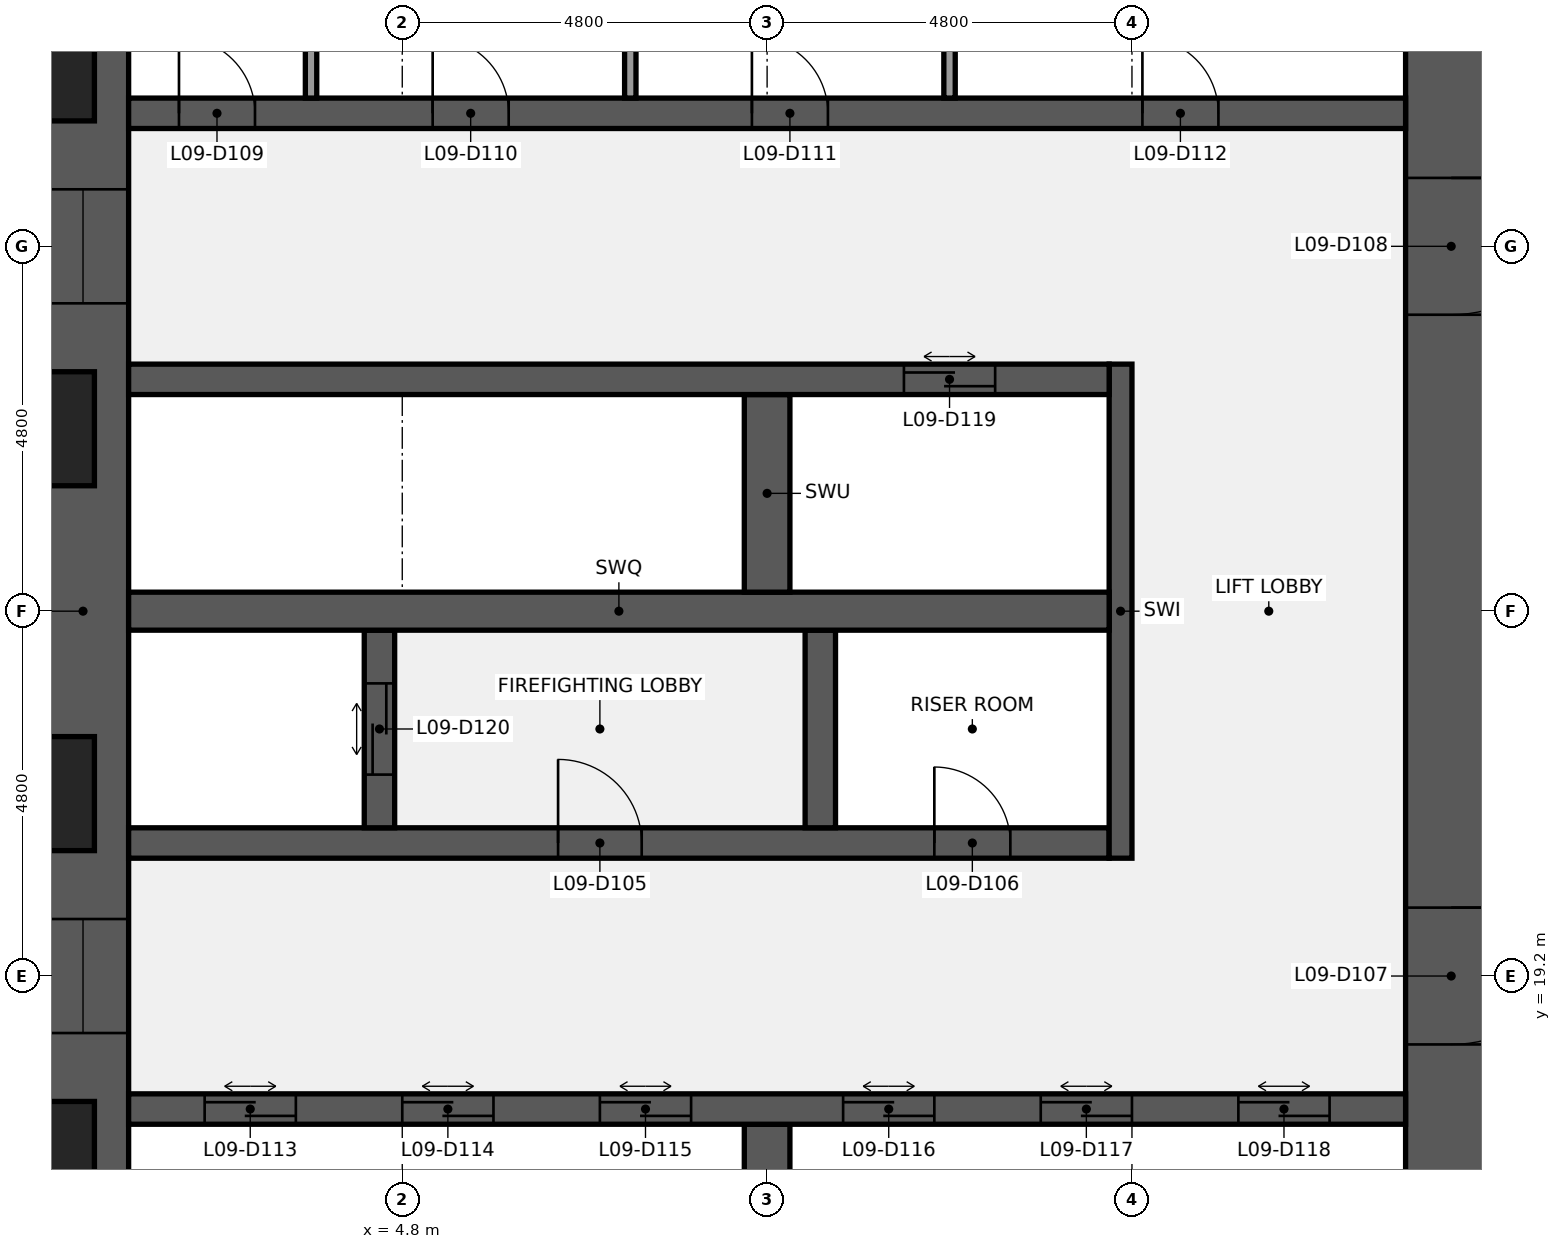
"""IFC4 building model, lengths in metres.
Left out: names, types, materials, properties, quantities, classifications, styles, units other than length and angle.
Written with IfcOpenShell. Run it as: python <this file> out.ifc"""

import sys

from ifc_helpers import new_model, si_unit, direction, frame, frame_2d, origin, place, context, subcontext, project, spatial, rectangle, extrude, element, fill, save


model = new_model("IFC4")
c1 = context("Model", 3, precision=1e-05, world=origin(), true_north=direction((0.0, 1.0)))
c2 = subcontext(c1, "Body", "Model", "MODEL_VIEW")
j1 = project(units=[si_unit("LENGTHUNIT", "METRE"), si_unit("PLANEANGLEUNIT", "RADIAN")], contexts=[c1])
p1 = place(None, origin())
s1 = spatial("IfcSite", under=j1, at=p1, CompositionType="ELEMENT")
p2 = place(p1, origin())
s2 = spatial("IfcBuilding", under=s1, at=p2, CompositionType="ELEMENT")
p3 = place(p2, frame((0.0, 0.0, 47.0)))
s3 = spatial("IfcBuildingStorey", under=s2, at=p3, CompositionType="ELEMENT", Elevation=47.0)
p4 = place(p3, frame((0.6, 9.6, 0.0), z_axis=(0.0, 0.0, 1.0), x_axis=(0.0, 1.0, 0.0)))
e1 = element("IfcWall", 1, at=p4, inside=s3, PredefinedType="SHEAR", context=c2, shape_type="SweptSolid", body=[
    extrude(rectangle(XDim=28.8, YDim=1.2, at=frame_2d((14.4, 0.0))), origin(), (0.0, 0.0, 1.0), 3.84),
])
p5 = place(p4, frame((8.85, 0.0, 0.9)))
e2 = element("IfcOpeningElement", 2, at=p5, cuts=e1, PredefinedType="OPENING", context=c2, shape_type="SweptSolid", body=[
    extrude(rectangle(XDim=1.5, YDim=1.5, at=frame_2d((0.75, 0.75))), frame((0.0, 0.61, 0.0), z_axis=(0.0, -1.0, 0.0), x_axis=(1.0, 0.0, 0.0)), (0.0, 0.0, 1.0), 1.22),
])
p6 = place(p4, frame((18.45, 0.0, 0.9)))
e3 = element("IfcOpeningElement", 3, at=p6, cuts=e1, PredefinedType="OPENING", context=c2, shape_type="SweptSolid", body=[
    extrude(rectangle(XDim=1.5, YDim=1.5, at=frame_2d((0.75, 0.75))), frame((0.0, 0.61, 0.0), z_axis=(0.0, -1.0, 0.0), x_axis=(1.0, 0.0, 0.0)), (0.0, 0.0, 1.0), 1.22),
])
p7 = place(p3, frame((18.6, 38.4, 0.0), z_axis=(0.0, 0.0, 1.0), x_axis=(0.0, -1.0, 0.0)))
e4 = element("IfcWall", 4, at=p7, inside=s3, PredefinedType="SHEAR", context=c2, shape_type="SweptSolid", body=[
    extrude(rectangle(XDim=28.8, YDim=1.2, at=frame_2d((14.4, 0.0))), origin(), (0.0, 0.0, 1.0), 3.84),
])
p8 = place(p7, frame((18.3, 0.0, 0.0)))
e5 = element("IfcOpeningElement", 5, at=p8, cuts=e4, PredefinedType="OPENING", context=c2, shape_type="SweptSolid", body=[
    extrude(rectangle(XDim=1.8, YDim=2.1, at=frame_2d((0.9, 1.05))), frame((0.0, 0.61, 0.0), z_axis=(0.0, -1.0, 0.0), x_axis=(1.0, 0.0, 0.0)), (0.0, 0.0, 1.0), 1.22),
])
p9 = place(p7, frame((8.7, 0.0, 0.0)))
e6 = element("IfcOpeningElement", 6, at=p9, cuts=e4, PredefinedType="OPENING", context=c2, shape_type="SweptSolid", body=[
    extrude(rectangle(XDim=1.8, YDim=2.1, at=frame_2d((0.9, 1.05))), frame((0.0, 0.61, 0.0), z_axis=(0.0, -1.0, 0.0), x_axis=(1.0, 0.0, 0.0)), (0.0, 0.0, 1.0), 1.22),
])
p10 = place(p3, frame((9.6, 14.65, 0.0), z_axis=(0.0, 0.0, 1.0), x_axis=(0.0, 1.0, 0.0)))
e7 = element("IfcWall", 7, at=p10, inside=s3, PredefinedType="SHEAR", context=c2, shape_type="SweptSolid", body=[
    extrude(rectangle(XDim=2.6, YDim=0.6, at=frame_2d((1.3, 0.0))), origin(), (0.0, 0.0, 1.0), 3.84),
])
p11 = place(p3, frame((1.2, 17.45, 0.0), z_axis=(0.0, 0.0, 1.0), x_axis=(1.0, 0.0, 0.0)))
e8 = element("IfcWall", 8, at=p11, inside=s3, PredefinedType="SHEAR", context=c2, shape_type="SweptSolid", body=[
    extrude(rectangle(XDim=16.8, YDim=0.4, at=frame_2d((8.4, 0.0))), origin(), (0.0, 0.0, 1.0), 3.84),
])
p12 = place(p11, frame((1.0, 0.0, 0.0)))
e9 = element("IfcOpeningElement", 9, at=p12, cuts=e8, PredefinedType="OPENING", context=c2, shape_type="SweptSolid", body=[
    extrude(rectangle(XDim=1.2, YDim=2.1, at=frame_2d((0.6, 1.05))), frame((0.0, 0.21, 0.0), z_axis=(0.0, -1.0, 0.0), x_axis=(1.0, 0.0, 0.0)), (0.0, 0.0, 1.0), 0.42),
])
p13 = place(p11, frame((3.6, 0.0, 0.0)))
e10 = element("IfcOpeningElement", 10, at=p13, cuts=e8, PredefinedType="OPENING", context=c2, shape_type="SweptSolid", body=[
    extrude(rectangle(XDim=1.2, YDim=2.1, at=frame_2d((0.6, 1.05))), frame((0.0, 0.21, 0.0), z_axis=(0.0, -1.0, 0.0), x_axis=(1.0, 0.0, 0.0)), (0.0, 0.0, 1.0), 0.42),
])
p14 = place(p11, frame((6.2, 0.0, 0.0)))
e11 = element("IfcOpeningElement", 11, at=p14, cuts=e8, PredefinedType="OPENING", context=c2, shape_type="SweptSolid", body=[
    extrude(rectangle(XDim=1.2, YDim=2.1, at=frame_2d((0.6, 1.05))), frame((0.0, 0.21, 0.0), z_axis=(0.0, -1.0, 0.0), x_axis=(1.0, 0.0, 0.0)), (0.0, 0.0, 1.0), 0.42),
])
p15 = place(p11, frame((9.4, 0.0, 0.0)))
e12 = element("IfcOpeningElement", 12, at=p15, cuts=e8, PredefinedType="OPENING", context=c2, shape_type="SweptSolid", body=[
    extrude(rectangle(XDim=1.2, YDim=2.1, at=frame_2d((0.6, 1.05))), frame((0.0, 0.21, 0.0), z_axis=(0.0, -1.0, 0.0), x_axis=(1.0, 0.0, 0.0)), (0.0, 0.0, 1.0), 0.42),
])
p16 = place(p11, frame((12.0, 0.0, 0.0)))
e13 = element("IfcOpeningElement", 13, at=p16, cuts=e8, PredefinedType="OPENING", context=c2, shape_type="SweptSolid", body=[
    extrude(rectangle(XDim=1.2, YDim=2.1, at=frame_2d((0.6, 1.05))), frame((0.0, 0.21, 0.0), z_axis=(0.0, -1.0, 0.0), x_axis=(1.0, 0.0, 0.0)), (0.0, 0.0, 1.0), 0.42),
])
p17 = place(p11, frame((14.6, 0.0, 0.0)))
e14 = element("IfcOpeningElement", 14, at=p17, cuts=e8, PredefinedType="OPENING", context=c2, shape_type="SweptSolid", body=[
    extrude(rectangle(XDim=1.2, YDim=2.1, at=frame_2d((0.6, 1.05))), frame((0.0, 0.21, 0.0), z_axis=(0.0, -1.0, 0.0), x_axis=(1.0, 0.0, 0.0)), (0.0, 0.0, 1.0), 0.42),
])
p18 = place(p3, frame((1.2, 20.95, 0.0), z_axis=(0.0, 0.0, 1.0), x_axis=(1.0, 0.0, 0.0)))
e15 = element("IfcWall", 15, at=p18, inside=s3, PredefinedType="SHEAR", context=c2, shape_type="SweptSolid", body=[
    extrude(rectangle(XDim=12.9, YDim=0.4, at=frame_2d((6.45, 0.0))), origin(), (0.0, 0.0, 1.0), 3.84),
])
p19 = place(p18, frame((5.65, 0.0, 0.0)))
e16 = element("IfcOpeningElement", 16, at=p19, cuts=e15, PredefinedType="OPENING", context=c2, shape_type="SweptSolid", body=[
    extrude(rectangle(XDim=1.1, YDim=2.1, at=frame_2d((0.55, 1.05))), frame((0.0, 0.21, 0.0), z_axis=(0.0, -1.0, 0.0), x_axis=(1.0, 0.0, 0.0)), (0.0, 0.0, 1.0), 0.42),
])
p20 = place(p18, frame((10.6, 0.0, 0.0)))
e17 = element("IfcOpeningElement", 17, at=p20, cuts=e15, PredefinedType="OPENING", context=c2, shape_type="SweptSolid", body=[
    extrude(rectangle(XDim=1.0, YDim=2.1, at=frame_2d((0.5, 1.05))), frame((0.0, 0.21, 0.0), z_axis=(0.0, -1.0, 0.0), x_axis=(1.0, 0.0, 0.0)), (0.0, 0.0, 1.0), 0.42),
])
p21 = place(p3, frame((14.25, 20.75, 0.0), z_axis=(0.0, 0.0, 1.0), x_axis=(0.0, 1.0, 0.0)))
e18 = element("IfcWall", 18, at=p21, inside=s3, PredefinedType="SHEAR", context=c2, shape_type="SweptSolid", body=[
    extrude(rectangle(XDim=6.5, YDim=0.3, at=frame_2d((3.25, 0.0))), origin(), (0.0, 0.0, 1.0), 3.84),
])
p22 = place(p3, frame((4.5, 21.15, 0.0), z_axis=(0.0, 0.0, 1.0), x_axis=(0.0, 1.0, 0.0)))
e19 = element("IfcWall", 19, at=p22, inside=s3, PredefinedType="SHEAR", context=c2, shape_type="SweptSolid", body=[
    extrude(rectangle(XDim=2.6, YDim=0.4, at=frame_2d((1.3, 0.0))), origin(), (0.0, 0.0, 1.0), 3.84),
])
p23 = place(p22, frame((0.7, 0.0, 0.0)))
e20 = element("IfcOpeningElement", 20, at=p23, cuts=e19, PredefinedType="OPENING", context=c2, shape_type="SweptSolid", body=[
    extrude(rectangle(XDim=1.2, YDim=2.1, at=frame_2d((0.6, 1.05))), frame((0.0, 0.21, 0.0), z_axis=(0.0, -1.0, 0.0), x_axis=(1.0, 0.0, 0.0)), (0.0, 0.0, 1.0), 0.42),
])
p24 = place(p3, frame((10.3, 21.15, 0.0), z_axis=(0.0, 0.0, 1.0), x_axis=(0.0, 1.0, 0.0)))
e21 = element("IfcWall", 21, at=p24, inside=s3, PredefinedType="SHEAR", context=c2, shape_type="SweptSolid", body=[
    extrude(rectangle(XDim=2.6, YDim=0.4, at=frame_2d((1.3, 0.0))), origin(), (0.0, 0.0, 1.0), 3.84),
])
p25 = place(p3, frame((1.2, 24.0, 0.0), z_axis=(0.0, 0.0, 1.0), x_axis=(1.0, 0.0, 0.0)))
e22 = element("IfcWall", 22, at=p25, inside=s3, PredefinedType="SHEAR", context=c2, shape_type="SweptSolid", body=[
    extrude(rectangle(XDim=12.9, YDim=0.5, at=frame_2d((6.45, 0.0))), origin(), (0.0, 0.0, 1.0), 3.84),
])
p26 = place(p3, frame((9.6, 24.25, 0.0), z_axis=(0.0, 0.0, 1.0), x_axis=(0.0, 1.0, 0.0)))
e23 = element("IfcWall", 23, at=p26, inside=s3, PredefinedType="SHEAR", context=c2, shape_type="SweptSolid", body=[
    extrude(rectangle(XDim=2.6, YDim=0.6, at=frame_2d((1.3, 0.0))), origin(), (0.0, 0.0, 1.0), 3.84),
])
p27 = place(p3, frame((1.2, 27.05, 0.0), z_axis=(0.0, 0.0, 1.0), x_axis=(1.0, 0.0, 0.0)))
e24 = element("IfcWall", 24, at=p27, inside=s3, PredefinedType="SHEAR", context=c2, shape_type="SweptSolid", body=[
    extrude(rectangle(XDim=12.9, YDim=0.4, at=frame_2d((6.45, 0.0))), origin(), (0.0, 0.0, 1.0), 3.84),
])
p28 = place(p27, frame((10.2, 0.0, 0.0)))
e25 = element("IfcOpeningElement", 25, at=p28, cuts=e24, PredefinedType="OPENING", context=c2, shape_type="SweptSolid", body=[
    extrude(rectangle(XDim=1.2, YDim=2.1, at=frame_2d((0.6, 1.05))), frame((0.0, 0.21, 0.0), z_axis=(0.0, -1.0, 0.0), x_axis=(1.0, 0.0, 0.0)), (0.0, 0.0, 1.0), 0.42),
])
p29 = place(p3, frame((1.2, 30.55, 0.0), z_axis=(0.0, 0.0, 1.0), x_axis=(1.0, 0.0, 0.0)))
e26 = element("IfcWall", 26, at=p29, inside=s3, PredefinedType="SHEAR", context=c2, shape_type="SweptSolid", body=[
    extrude(rectangle(XDim=16.8, YDim=0.4, at=frame_2d((8.4, 0.0))), origin(), (0.0, 0.0, 1.0), 3.84),
])
p30 = place(p29, frame((0.663, 0.0, 0.0)))
e27 = element("IfcOpeningElement", 27, at=p30, cuts=e26, PredefinedType="OPENING", context=c2, shape_type="SweptSolid", body=[
    extrude(rectangle(XDim=1.0, YDim=2.1, at=frame_2d((0.5, 1.05))), frame((0.0, 0.21, 0.0), z_axis=(0.0, -1.0, 0.0), x_axis=(1.0, 0.0, 0.0)), (0.0, 0.0, 1.0), 0.42),
])
p31 = place(p29, frame((4.0, 0.0, 0.0)))
e28 = element("IfcOpeningElement", 28, at=p31, cuts=e26, PredefinedType="OPENING", context=c2, shape_type="SweptSolid", body=[
    extrude(rectangle(XDim=1.0, YDim=2.1, at=frame_2d((0.5, 1.05))), frame((0.0, 0.21, 0.0), z_axis=(0.0, -1.0, 0.0), x_axis=(1.0, 0.0, 0.0)), (0.0, 0.0, 1.0), 0.42),
])
p32 = place(p29, frame((8.2, 0.0, 0.0)))
e29 = element("IfcOpeningElement", 29, at=p32, cuts=e26, PredefinedType="OPENING", context=c2, shape_type="SweptSolid", body=[
    extrude(rectangle(XDim=1.0, YDim=2.1, at=frame_2d((0.5, 1.05))), frame((0.0, 0.21, 0.0), z_axis=(0.0, -1.0, 0.0), x_axis=(1.0, 0.0, 0.0)), (0.0, 0.0, 1.0), 0.42),
])
p33 = place(p29, frame((13.337, 0.0, 0.0)))
e30 = element("IfcOpeningElement", 30, at=p33, cuts=e26, PredefinedType="OPENING", context=c2, shape_type="SweptSolid", body=[
    extrude(rectangle(XDim=1.0, YDim=2.1, at=frame_2d((0.5, 1.05))), frame((0.0, 0.21, 0.0), z_axis=(0.0, -1.0, 0.0), x_axis=(1.0, 0.0, 0.0)), (0.0, 0.0, 1.0), 0.42),
])
for number, where, z_axis, x_axis in (
    (31, (3.6, 30.75, 0.0), (0.0, 0.0, 1.0), (0.0, 1.0, 0.0)),
    (32, (7.8, 30.75, 0.0), (0.0, 0.0, 1.0), (0.0, 1.0, 0.0)),
    (33, (12.0, 30.75, 0.0), (0.0, 0.0, 1.0), (0.0, 1.0, 0.0)),
):
    element("IfcWall", number, at=place(p3, frame(where, z_axis=z_axis, x_axis=x_axis)), inside=s3, PredefinedType="PARTITIONING", context=c2, shape_type="SweptSolid", body=[
        extrude(rectangle(XDim=2.6, YDim=0.15, at=frame_2d((1.3, 0.0))), origin(), (0.0, 0.0, 1.0), 3.84),
    ])
p34 = place(p19, origin())
e34 = element("IfcDoor", 34, at=p34, inside=s3, OperationType="SINGLE_SWING_LEFT", PredefinedType="DOOR", context=c2, shape_type="SweptSolid", body=[
    extrude(rectangle(XDim=1.1, YDim=2.1, at=frame_2d((0.55, 1.05))), frame((0.0, 0.025, 0.0), z_axis=(0.0, -1.0, 0.0), x_axis=(1.0, 0.0, 0.0)), (0.0, 0.0, 1.0), 0.05),
])
fill(e16, e34)
p35 = place(p20, origin())
e35 = element("IfcDoor", 35, at=p35, inside=s3, OperationType="SINGLE_SWING_LEFT", PredefinedType="DOOR", context=c2, shape_type="SweptSolid", body=[
    extrude(rectangle(XDim=1.0, YDim=2.1, at=frame_2d((0.5, 1.05))), frame((0.0, 0.025, 0.0), z_axis=(0.0, -1.0, 0.0), x_axis=(1.0, 0.0, 0.0)), (0.0, 0.0, 1.0), 0.05),
])
fill(e17, e35)
p36 = place(p8, origin())
e36 = element("IfcDoor", 36, at=p36, inside=s3, OperationType="DOUBLE_DOOR_SINGLE_SWING", PredefinedType="DOOR", context=c2, shape_type="SweptSolid", body=[
    extrude(rectangle(XDim=1.8, YDim=2.1, at=frame_2d((0.9, 1.05))), frame((0.0, 0.025, 0.0), z_axis=(0.0, -1.0, 0.0), x_axis=(1.0, 0.0, 0.0)), (0.0, 0.0, 1.0), 0.05),
])
fill(e5, e36)
p37 = place(p9, origin())
e37 = element("IfcDoor", 37, at=p37, inside=s3, OperationType="DOUBLE_DOOR_SINGLE_SWING", PredefinedType="DOOR", context=c2, shape_type="SweptSolid", body=[
    extrude(rectangle(XDim=1.8, YDim=2.1, at=frame_2d((0.9, 1.05))), frame((0.0, 0.025, 0.0), z_axis=(0.0, -1.0, 0.0), x_axis=(1.0, 0.0, 0.0)), (0.0, 0.0, 1.0), 0.05),
])
fill(e6, e37)
p38 = place(p30, origin())
e38 = element("IfcDoor", 38, at=p38, inside=s3, OperationType="SINGLE_SWING_LEFT", PredefinedType="DOOR", context=c2, shape_type="SweptSolid", body=[
    extrude(rectangle(XDim=1.0, YDim=2.1, at=frame_2d((0.5, 1.05))), frame((0.0, 0.025, 0.0), z_axis=(0.0, -1.0, 0.0), x_axis=(1.0, 0.0, 0.0)), (0.0, 0.0, 1.0), 0.05),
])
fill(e27, e38)
p39 = place(p31, origin())
e39 = element("IfcDoor", 39, at=p39, inside=s3, OperationType="SINGLE_SWING_LEFT", PredefinedType="DOOR", context=c2, shape_type="SweptSolid", body=[
    extrude(rectangle(XDim=1.0, YDim=2.1, at=frame_2d((0.5, 1.05))), frame((0.0, 0.025, 0.0), z_axis=(0.0, -1.0, 0.0), x_axis=(1.0, 0.0, 0.0)), (0.0, 0.0, 1.0), 0.05),
])
fill(e28, e39)
p40 = place(p32, origin())
e40 = element("IfcDoor", 40, at=p40, inside=s3, OperationType="SINGLE_SWING_LEFT", PredefinedType="DOOR", context=c2, shape_type="SweptSolid", body=[
    extrude(rectangle(XDim=1.0, YDim=2.1, at=frame_2d((0.5, 1.05))), frame((0.0, 0.025, 0.0), z_axis=(0.0, -1.0, 0.0), x_axis=(1.0, 0.0, 0.0)), (0.0, 0.0, 1.0), 0.05),
])
fill(e29, e40)
p41 = place(p33, origin())
e41 = element("IfcDoor", 41, at=p41, inside=s3, OperationType="SINGLE_SWING_LEFT", PredefinedType="DOOR", context=c2, shape_type="SweptSolid", body=[
    extrude(rectangle(XDim=1.0, YDim=2.1, at=frame_2d((0.5, 1.05))), frame((0.0, 0.025, 0.0), z_axis=(0.0, -1.0, 0.0), x_axis=(1.0, 0.0, 0.0)), (0.0, 0.0, 1.0), 0.05),
])
fill(e30, e41)
p42 = place(p12, origin())
e42 = element("IfcDoor", 42, at=p42, inside=s3, OperationType="DOUBLE_DOOR_SLIDING", PredefinedType="DOOR", context=c2, shape_type="SweptSolid", body=[
    extrude(rectangle(XDim=1.2, YDim=2.1, at=frame_2d((0.6, 1.05))), frame((0.0, 0.025, 0.0), z_axis=(0.0, -1.0, 0.0), x_axis=(1.0, 0.0, 0.0)), (0.0, 0.0, 1.0), 0.05),
])
fill(e9, e42)
p43 = place(p13, origin())
e43 = element("IfcDoor", 43, at=p43, inside=s3, OperationType="DOUBLE_DOOR_SLIDING", PredefinedType="DOOR", context=c2, shape_type="SweptSolid", body=[
    extrude(rectangle(XDim=1.2, YDim=2.1, at=frame_2d((0.6, 1.05))), frame((0.0, 0.025, 0.0), z_axis=(0.0, -1.0, 0.0), x_axis=(1.0, 0.0, 0.0)), (0.0, 0.0, 1.0), 0.05),
])
fill(e10, e43)
p44 = place(p14, origin())
e44 = element("IfcDoor", 44, at=p44, inside=s3, OperationType="DOUBLE_DOOR_SLIDING", PredefinedType="DOOR", context=c2, shape_type="SweptSolid", body=[
    extrude(rectangle(XDim=1.2, YDim=2.1, at=frame_2d((0.6, 1.05))), frame((0.0, 0.025, 0.0), z_axis=(0.0, -1.0, 0.0), x_axis=(1.0, 0.0, 0.0)), (0.0, 0.0, 1.0), 0.05),
])
fill(e11, e44)
p45 = place(p15, origin())
e45 = element("IfcDoor", 45, at=p45, inside=s3, OperationType="DOUBLE_DOOR_SLIDING", PredefinedType="DOOR", context=c2, shape_type="SweptSolid", body=[
    extrude(rectangle(XDim=1.2, YDim=2.1, at=frame_2d((0.6, 1.05))), frame((0.0, 0.025, 0.0), z_axis=(0.0, -1.0, 0.0), x_axis=(1.0, 0.0, 0.0)), (0.0, 0.0, 1.0), 0.05),
])
fill(e12, e45)
p46 = place(p16, origin())
e46 = element("IfcDoor", 46, at=p46, inside=s3, OperationType="DOUBLE_DOOR_SLIDING", PredefinedType="DOOR", context=c2, shape_type="SweptSolid", body=[
    extrude(rectangle(XDim=1.2, YDim=2.1, at=frame_2d((0.6, 1.05))), frame((0.0, 0.025, 0.0), z_axis=(0.0, -1.0, 0.0), x_axis=(1.0, 0.0, 0.0)), (0.0, 0.0, 1.0), 0.05),
])
fill(e13, e46)
p47 = place(p17, origin())
e47 = element("IfcDoor", 47, at=p47, inside=s3, OperationType="DOUBLE_DOOR_SLIDING", PredefinedType="DOOR", context=c2, shape_type="SweptSolid", body=[
    extrude(rectangle(XDim=1.2, YDim=2.1, at=frame_2d((0.6, 1.05))), frame((0.0, 0.025, 0.0), z_axis=(0.0, -1.0, 0.0), x_axis=(1.0, 0.0, 0.0)), (0.0, 0.0, 1.0), 0.05),
])
fill(e14, e47)
p48 = place(p28, origin())
e48 = element("IfcDoor", 48, at=p48, inside=s3, OperationType="DOUBLE_DOOR_SLIDING", PredefinedType="DOOR", context=c2, shape_type="SweptSolid", body=[
    extrude(rectangle(XDim=1.2, YDim=2.1, at=frame_2d((0.6, 1.05))), frame((0.0, 0.025, 0.0), z_axis=(0.0, -1.0, 0.0), x_axis=(1.0, 0.0, 0.0)), (0.0, 0.0, 1.0), 0.05),
])
fill(e25, e48)
p49 = place(p23, origin())
e49 = element("IfcDoor", 49, at=p49, inside=s3, OperationType="DOUBLE_DOOR_SLIDING", PredefinedType="DOOR", context=c2, shape_type="SweptSolid", body=[
    extrude(rectangle(XDim=1.2, YDim=2.1, at=frame_2d((0.6, 1.05))), frame((0.0, 0.025, 0.0), z_axis=(0.0, -1.0, 0.0), x_axis=(1.0, 0.0, 0.0)), (0.0, 0.0, 1.0), 0.05),
])
fill(e20, e49)
p50 = place(p5, origin())
e50 = element("IfcWindow", 50, at=p50, inside=s3, PartitioningType="SINGLE_PANEL", PredefinedType="WINDOW", context=c2, shape_type="SweptSolid", body=[
    extrude(rectangle(XDim=1.5, YDim=1.5, at=frame_2d((0.75, 0.75))), frame((0.0, 0.03, 0.0), z_axis=(0.0, -1.0, 0.0), x_axis=(1.0, 0.0, 0.0)), (0.0, 0.0, 1.0), 0.06),
])
fill(e2, e50)
p51 = place(p6, origin())
e51 = element("IfcWindow", 51, at=p51, inside=s3, PartitioningType="SINGLE_PANEL", PredefinedType="WINDOW", context=c2, shape_type="SweptSolid", body=[
    extrude(rectangle(XDim=1.5, YDim=1.5, at=frame_2d((0.75, 0.75))), frame((0.0, 0.03, 0.0), z_axis=(0.0, -1.0, 0.0), x_axis=(1.0, 0.0, 0.0)), (0.0, 0.0, 1.0), 0.06),
])
fill(e3, e51)
save(model, sys.argv[1])
